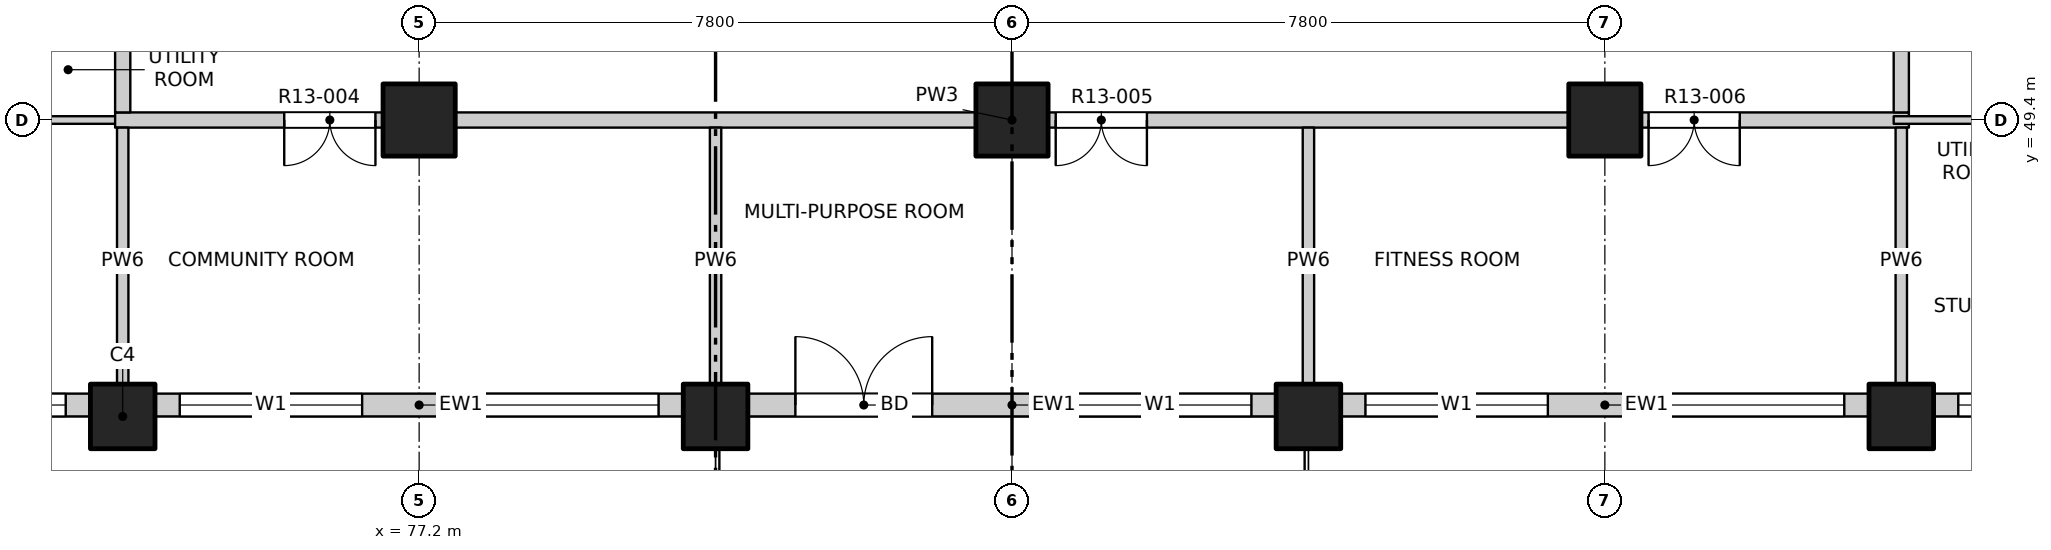
"""IFC4 building model, lengths in metres.
Left out: names, types, materials, properties, quantities, classifications, styles, units other than length and angle.
Written with IfcOpenShell. Run it as: python <this file> out.ifc"""

import sys

from ifc_helpers import new_model, si_unit, direction, frame, frame_2d, origin, origin_2d, place, context, subcontext, project, spatial, rectangle, extrude, element, fill, save


model = new_model("IFC4")
c1 = context("Model", 3, precision=1e-05, world=origin(), true_north=direction((0.0, 1.0)))
c2 = subcontext(c1, "Body", "Model", "MODEL_VIEW")
j1 = project(units=[si_unit("LENGTHUNIT", "METRE"), si_unit("PLANEANGLEUNIT", "RADIAN")], contexts=[c1])
p1 = place(None, origin())
s1 = spatial("IfcSite", under=j1, at=p1, CompositionType="ELEMENT")
p2 = place(p1, origin())
s2 = spatial("IfcBuilding", under=s1, at=p2, CompositionType="ELEMENT")
p3 = place(p2, frame((0.0, 0.0, 140.7)))
s3 = spatial("IfcBuildingStorey", under=s2, at=p3, CompositionType="ELEMENT", Elevation=140.7)
for number, where, z_axis, x_axis in (
    (1, (73.3, 45.5, -0.25), (0.0, 0.0, 1.0), (1.0, 0.0, 0.0)),
    (2, (81.1, 45.5, -0.25), (0.0, 0.0, 1.0), (1.0, 0.0, 0.0)),
    (3, (88.9, 45.5, -0.25), (0.0, 0.0, 1.0), (1.0, 0.0, 0.0)),
    (4, (96.7, 45.5, -0.25), (0.0, 0.0, 1.0), (1.0, 0.0, 0.0)),
):
    element("IfcColumn", number, at=place(p3, frame(where, z_axis=z_axis, x_axis=x_axis)), inside=s3, PredefinedType="COLUMN", context=c2, shape_type="SweptSolid", body=[
        extrude(rectangle(XDim=0.85, YDim=0.85, at=origin_2d()), origin(), (0.0, 0.0, 1.0), 3.35),
    ])
for number, where, z_axis, x_axis in (
    (5, (77.2, 49.4, -0.25), (0.0, 0.0, 1.0), (1.0, 0.0, 0.0)),
    (6, (85.0, 49.4, -0.25), (0.0, 0.0, 1.0), (1.0, 0.0, 0.0)),
    (7, (92.8, 49.4, -0.25), (0.0, 0.0, 1.0), (1.0, 0.0, 0.0)),
):
    element("IfcColumn", number, at=place(p3, frame(where, z_axis=z_axis, x_axis=x_axis)), inside=s3, PredefinedType="COLUMN", context=c2, shape_type="SweptSolid", body=[
        extrude(rectangle(XDim=0.95, YDim=0.95, at=origin_2d()), origin(), (0.0, 0.0, 1.0), 3.35),
    ])
p4 = place(p3, frame((69.4, 45.65, 0.0), z_axis=(0.0, 0.0, 1.0), x_axis=(1.0, 0.0, 0.0)))
e8 = element("IfcWall", 8, at=p4, inside=s3, PredefinedType="SOLIDWALL", context=c2, shape_type="SweptSolid", body=[
    extrude(rectangle(XDim=3.475, YDim=0.3, at=frame_2d((1.738, 0.0))), origin(), (0.0, 0.0, 1.0), 3.1),
])
p5 = place(p4, frame((0.75, 0.0, 0.9)))
e9 = element("IfcOpeningElement", 9, at=p5, cuts=e8, PredefinedType="OPENING", context=c2, shape_type="SweptSolid", body=[
    extrude(rectangle(XDim=2.4, YDim=1.8, at=frame_2d((1.2, 0.9))), frame((0.0, 0.16, 0.0), z_axis=(0.0, -1.0, 0.0), x_axis=(1.0, 0.0, 0.0)), (0.0, 0.0, 1.0), 0.32),
])
p6 = place(p3, frame((73.725, 45.65, 0.0), z_axis=(0.0, 0.0, 1.0), x_axis=(1.0, 0.0, 0.0)))
e10 = element("IfcWall", 10, at=p6, inside=s3, PredefinedType="SOLIDWALL", context=c2, shape_type="SweptSolid", body=[
    extrude(rectangle(XDim=6.95, YDim=0.3, at=frame_2d((3.475, 0.0))), origin(), (0.0, 0.0, 1.0), 3.1),
])
p7 = place(p6, frame((0.325, 0.0, 0.9)))
e11 = element("IfcOpeningElement", 11, at=p7, cuts=e10, PredefinedType="OPENING", context=c2, shape_type="SweptSolid", body=[
    extrude(rectangle(XDim=2.4, YDim=1.8, at=frame_2d((1.2, 0.9))), frame((0.0, 0.16, 0.0), z_axis=(0.0, -1.0, 0.0), x_axis=(1.0, 0.0, 0.0)), (0.0, 0.0, 1.0), 0.32),
])
p8 = place(p6, frame((4.225, 0.0, 0.9)))
e12 = element("IfcOpeningElement", 12, at=p8, cuts=e10, PredefinedType="OPENING", context=c2, shape_type="SweptSolid", body=[
    extrude(rectangle(XDim=2.4, YDim=1.8, at=frame_2d((1.2, 0.9))), frame((0.0, 0.16, 0.0), z_axis=(0.0, -1.0, 0.0), x_axis=(1.0, 0.0, 0.0)), (0.0, 0.0, 1.0), 0.32),
])
p9 = place(p3, frame((81.525, 45.65, 0.0), z_axis=(0.0, 0.0, 1.0), x_axis=(1.0, 0.0, 0.0)))
e13 = element("IfcWall", 13, at=p9, inside=s3, PredefinedType="SOLIDWALL", context=c2, shape_type="SweptSolid", body=[
    extrude(rectangle(XDim=6.95, YDim=0.3, at=frame_2d((3.475, 0.0))), origin(), (0.0, 0.0, 1.0), 3.1),
])
p10 = place(p9, frame((0.625, 0.0, 0.0)))
e14 = element("IfcOpeningElement", 14, at=p10, cuts=e13, PredefinedType="OPENING", context=c2, shape_type="SweptSolid", body=[
    extrude(rectangle(XDim=1.8, YDim=2.4, at=frame_2d((0.9, 1.2))), frame((0.0, 0.16, 0.0), z_axis=(0.0, -1.0, 0.0), x_axis=(1.0, 0.0, 0.0)), (0.0, 0.0, 1.0), 0.32),
])
p11 = place(p9, frame((4.225, 0.0, 0.9)))
e15 = element("IfcOpeningElement", 15, at=p11, cuts=e13, PredefinedType="OPENING", context=c2, shape_type="SweptSolid", body=[
    extrude(rectangle(XDim=2.4, YDim=1.8, at=frame_2d((1.2, 0.9))), frame((0.0, 0.16, 0.0), z_axis=(0.0, -1.0, 0.0), x_axis=(1.0, 0.0, 0.0)), (0.0, 0.0, 1.0), 0.32),
])
p12 = place(p3, frame((89.325, 45.65, 0.0), z_axis=(0.0, 0.0, 1.0), x_axis=(1.0, 0.0, 0.0)))
e16 = element("IfcWall", 16, at=p12, inside=s3, PredefinedType="SOLIDWALL", context=c2, shape_type="SweptSolid", body=[
    extrude(rectangle(XDim=6.95, YDim=0.3, at=frame_2d((3.475, 0.0))), origin(), (0.0, 0.0, 1.0), 3.1),
])
p13 = place(p12, frame((0.325, 0.0, 0.9)))
e17 = element("IfcOpeningElement", 17, at=p13, cuts=e16, PredefinedType="OPENING", context=c2, shape_type="SweptSolid", body=[
    extrude(rectangle(XDim=2.4, YDim=1.8, at=frame_2d((1.2, 0.9))), frame((0.0, 0.16, 0.0), z_axis=(0.0, -1.0, 0.0), x_axis=(1.0, 0.0, 0.0)), (0.0, 0.0, 1.0), 0.32),
])
p14 = place(p12, frame((4.225, 0.0, 0.9)))
e18 = element("IfcOpeningElement", 18, at=p14, cuts=e16, PredefinedType="OPENING", context=c2, shape_type="SweptSolid", body=[
    extrude(rectangle(XDim=2.4, YDim=1.8, at=frame_2d((1.2, 0.9))), frame((0.0, 0.16, 0.0), z_axis=(0.0, -1.0, 0.0), x_axis=(1.0, 0.0, 0.0)), (0.0, 0.0, 1.0), 0.32),
])
p15 = place(p3, frame((97.125, 45.65, 0.0), z_axis=(0.0, 0.0, 1.0), x_axis=(1.0, 0.0, 0.0)))
e19 = element("IfcWall", 19, at=p15, inside=s3, PredefinedType="SOLIDWALL", context=c2, shape_type="SweptSolid", body=[
    extrude(rectangle(XDim=3.475, YDim=0.3, at=frame_2d((1.738, 0.0))), origin(), (0.0, 0.0, 1.0), 3.1),
])
p16 = place(p15, frame((0.325, 0.0, 0.9)))
e20 = element("IfcOpeningElement", 20, at=p16, cuts=e19, PredefinedType="OPENING", context=c2, shape_type="SweptSolid", body=[
    extrude(rectangle(XDim=2.4, YDim=1.8, at=frame_2d((1.2, 0.9))), frame((0.0, 0.16, 0.0), z_axis=(0.0, -1.0, 0.0), x_axis=(1.0, 0.0, 0.0)), (0.0, 0.0, 1.0), 0.32),
])
p17 = place(p3, frame((65.8, 49.4, 0.0), z_axis=(0.0, 0.0, 1.0), x_axis=(1.0, 0.0, 0.0)))
e21 = element("IfcWall", 21, at=p17, inside=s3, PredefinedType="PARTITIONING", context=c2, shape_type="SweptSolid", body=[
    extrude(rectangle(XDim=7.6, YDim=0.1, at=frame_2d((3.8, 0.0))), origin(), (0.0, 0.0, 1.0), 3.1),
])
p18 = place(p17, frame((4.19, 0.0, 0.0)))
e22 = element("IfcOpeningElement", 22, at=p18, cuts=e21, PredefinedType="OPENING", context=c2, shape_type="SweptSolid", body=[
    extrude(rectangle(XDim=0.9, YDim=2.1, at=frame_2d((0.45, 1.05))), frame((0.0, 0.06, 0.0), z_axis=(0.0, -1.0, 0.0), x_axis=(1.0, 0.0, 0.0)), (0.0, 0.0, 1.0), 0.12),
])
p19 = place(p3, frame((73.2, 49.4, 0.0), z_axis=(0.0, 0.0, 1.0), x_axis=(1.0, 0.0, 0.0)))
e23 = element("IfcWall", 23, at=p19, inside=s3, PredefinedType="PARTITIONING", context=c2, shape_type="SweptSolid", body=[
    extrude(rectangle(XDim=23.6, YDim=0.2, at=frame_2d((11.8, 0.0))), origin(), (0.0, 0.0, 1.0), 3.1),
])
p20 = place(p19, frame((2.225, 0.0, 0.0)))
e24 = element("IfcOpeningElement", 24, at=p20, cuts=e23, PredefinedType="OPENING", context=c2, shape_type="SweptSolid", body=[
    extrude(rectangle(XDim=1.2, YDim=2.1, at=frame_2d((0.6, 1.05))), frame((0.0, 0.11, 0.0), z_axis=(0.0, -1.0, 0.0), x_axis=(1.0, 0.0, 0.0)), (0.0, 0.0, 1.0), 0.22),
])
p21 = place(p19, frame((12.375, 0.0, 0.0)))
e25 = element("IfcOpeningElement", 25, at=p21, cuts=e23, PredefinedType="OPENING", context=c2, shape_type="SweptSolid", body=[
    extrude(rectangle(XDim=1.2, YDim=2.1, at=frame_2d((0.6, 1.05))), frame((0.0, 0.11, 0.0), z_axis=(0.0, -1.0, 0.0), x_axis=(1.0, 0.0, 0.0)), (0.0, 0.0, 1.0), 0.22),
])
p22 = place(p19, frame((20.175, 0.0, 0.0)))
e26 = element("IfcOpeningElement", 26, at=p22, cuts=e23, PredefinedType="OPENING", context=c2, shape_type="SweptSolid", body=[
    extrude(rectangle(XDim=1.2, YDim=2.1, at=frame_2d((0.6, 1.05))), frame((0.0, 0.11, 0.0), z_axis=(0.0, -1.0, 0.0), x_axis=(1.0, 0.0, 0.0)), (0.0, 0.0, 1.0), 0.22),
])
p23 = place(p3, frame((96.6, 49.4, 0.0), z_axis=(0.0, 0.0, 1.0), x_axis=(1.0, 0.0, 0.0)))
e27 = element("IfcWall", 27, at=p23, inside=s3, PredefinedType="PARTITIONING", context=c2, shape_type="SweptSolid", body=[
    extrude(rectangle(XDim=7.6, YDim=0.1, at=frame_2d((3.8, 0.0))), origin(), (0.0, 0.0, 1.0), 3.1),
])
p24 = place(p23, frame((2.51, 0.0, 0.0)))
e28 = element("IfcOpeningElement", 28, at=p24, cuts=e27, PredefinedType="OPENING", context=c2, shape_type="SweptSolid", body=[
    extrude(rectangle(XDim=0.9, YDim=2.1, at=frame_2d((0.45, 1.05))), frame((0.0, 0.06, 0.0), z_axis=(0.0, -1.0, 0.0), x_axis=(1.0, 0.0, 0.0)), (0.0, 0.0, 1.0), 0.12),
])
p25 = place(p3, frame((73.3, 45.8, 0.0), z_axis=(0.0, 0.0, 1.0), x_axis=(0.0, 1.0, 0.0)))
e29 = element("IfcWall", 29, at=p25, inside=s3, PredefinedType="PARTITIONING", context=c2, shape_type="SweptSolid", body=[
    extrude(rectangle(XDim=3.5, YDim=0.15, at=frame_2d((1.75, 0.0))), origin(), (0.0, 0.0, 1.0), 3.1),
])
p26 = place(p3, frame((73.3, 49.5, 0.0), z_axis=(0.0, 0.0, 1.0), x_axis=(0.0, 1.0, 0.0)))
e30 = element("IfcWall", 30, at=p26, inside=s3, PredefinedType="PARTITIONING", context=c2, shape_type="SweptSolid", body=[
    extrude(rectangle(XDim=34.7, YDim=0.2, at=frame_2d((17.35, 0.0))), origin(), (0.0, 0.0, 1.0), 3.1),
])
p27 = place(p26, frame((3.575, 0.0, 0.0)))
e31 = element("IfcOpeningElement", 31, at=p27, cuts=e30, PredefinedType="OPENING", context=c2, shape_type="SweptSolid", body=[
    extrude(rectangle(XDim=1.0, YDim=2.1, at=frame_2d((0.5, 1.05))), frame((0.0, 0.11, 0.0), z_axis=(0.0, -1.0, 0.0), x_axis=(1.0, 0.0, 0.0)), (0.0, 0.0, 1.0), 0.22),
])
p28 = place(p26, frame((21.975, 0.0, 0.0)))
e32 = element("IfcOpeningElement", 32, at=p28, cuts=e30, PredefinedType="OPENING", context=c2, shape_type="SweptSolid", body=[
    extrude(rectangle(XDim=1.0, YDim=2.1, at=frame_2d((0.5, 1.05))), frame((0.0, 0.11, 0.0), z_axis=(0.0, -1.0, 0.0), x_axis=(1.0, 0.0, 0.0)), (0.0, 0.0, 1.0), 0.22),
])
p29 = place(p26, frame((29.125, 0.0, 0.0)))
e33 = element("IfcOpeningElement", 33, at=p29, cuts=e30, PredefinedType="OPENING", context=c2, shape_type="SweptSolid", body=[
    extrude(rectangle(XDim=1.0, YDim=2.1, at=frame_2d((0.5, 1.05))), frame((0.0, 0.11, 0.0), z_axis=(0.0, -1.0, 0.0), x_axis=(1.0, 0.0, 0.0)), (0.0, 0.0, 1.0), 0.22),
])
for number, where, z_axis, x_axis in (
    (34, (81.1, 45.8, 0.0), (0.0, 0.0, 1.0), (0.0, 1.0, 0.0)),
    (35, (88.9, 45.8, 0.0), (0.0, 0.0, 1.0), (0.0, 1.0, 0.0)),
    (36, (96.7, 45.8, 0.0), (0.0, 0.0, 1.0), (0.0, 1.0, 0.0)),
):
    element("IfcWall", number, at=place(p3, frame(where, z_axis=z_axis, x_axis=x_axis)), inside=s3, PredefinedType="PARTITIONING", context=c2, shape_type="SweptSolid", body=[
        extrude(rectangle(XDim=3.5, YDim=0.15, at=frame_2d((1.75, 0.0))), origin(), (0.0, 0.0, 1.0), 3.1),
    ])
p30 = place(p3, frame((96.7, 49.5, 0.0), z_axis=(0.0, 0.0, 1.0), x_axis=(0.0, 1.0, 0.0)))
e37 = element("IfcWall", 37, at=p30, inside=s3, PredefinedType="PARTITIONING", context=c2, shape_type="SweptSolid", body=[
    extrude(rectangle(XDim=34.7, YDim=0.2, at=frame_2d((17.35, 0.0))), origin(), (0.0, 0.0, 1.0), 3.1),
])
p31 = place(p30, frame((3.675, 0.0, 0.0)))
e38 = element("IfcOpeningElement", 38, at=p31, cuts=e37, PredefinedType="OPENING", context=c2, shape_type="SweptSolid", body=[
    extrude(rectangle(XDim=1.0, YDim=2.1, at=frame_2d((0.5, 1.05))), frame((0.0, 0.11, 0.0), z_axis=(0.0, -1.0, 0.0), x_axis=(1.0, 0.0, 0.0)), (0.0, 0.0, 1.0), 0.22),
])
p32 = place(p30, frame((21.725, 0.0, 0.0)))
e39 = element("IfcOpeningElement", 39, at=p32, cuts=e37, PredefinedType="OPENING", context=c2, shape_type="SweptSolid", body=[
    extrude(rectangle(XDim=1.0, YDim=2.1, at=frame_2d((0.5, 1.05))), frame((0.0, 0.11, 0.0), z_axis=(0.0, -1.0, 0.0), x_axis=(1.0, 0.0, 0.0)), (0.0, 0.0, 1.0), 0.22),
])
p33 = place(p30, frame((29.125, 0.0, 0.0)))
e40 = element("IfcOpeningElement", 40, at=p33, cuts=e37, PredefinedType="OPENING", context=c2, shape_type="SweptSolid", body=[
    extrude(rectangle(XDim=1.0, YDim=2.1, at=frame_2d((0.5, 1.05))), frame((0.0, 0.11, 0.0), z_axis=(0.0, -1.0, 0.0), x_axis=(1.0, 0.0, 0.0)), (0.0, 0.0, 1.0), 0.22),
])
p34 = place(p5, origin())
e41 = element("IfcWindow", 41, at=p34, inside=s3, PartitioningType="DOUBLE_PANEL_VERTICAL", PredefinedType="WINDOW", context=c2, shape_type="SweptSolid", body=[
    extrude(rectangle(XDim=2.4, YDim=1.8, at=frame_2d((1.2, 0.9))), frame((0.0, 0.03, 0.0), z_axis=(0.0, -1.0, 0.0), x_axis=(1.0, 0.0, 0.0)), (0.0, 0.0, 1.0), 0.06),
])
fill(e9, e41)
p35 = place(p7, origin())
e42 = element("IfcWindow", 42, at=p35, inside=s3, PartitioningType="DOUBLE_PANEL_VERTICAL", PredefinedType="WINDOW", context=c2, shape_type="SweptSolid", body=[
    extrude(rectangle(XDim=2.4, YDim=1.8, at=frame_2d((1.2, 0.9))), frame((0.0, 0.03, 0.0), z_axis=(0.0, -1.0, 0.0), x_axis=(1.0, 0.0, 0.0)), (0.0, 0.0, 1.0), 0.06),
])
fill(e11, e42)
p36 = place(p8, origin())
e43 = element("IfcWindow", 43, at=p36, inside=s3, PartitioningType="DOUBLE_PANEL_VERTICAL", PredefinedType="WINDOW", context=c2, shape_type="SweptSolid", body=[
    extrude(rectangle(XDim=2.4, YDim=1.8, at=frame_2d((1.2, 0.9))), frame((0.0, 0.03, 0.0), z_axis=(0.0, -1.0, 0.0), x_axis=(1.0, 0.0, 0.0)), (0.0, 0.0, 1.0), 0.06),
])
fill(e12, e43)
p37 = place(p10, origin())
e44 = element("IfcDoor", 44, at=p37, inside=s3, OperationType="DOUBLE_DOOR_SINGLE_SWING", PredefinedType="DOOR", context=c2, shape_type="SweptSolid", body=[
    extrude(rectangle(XDim=1.8, YDim=2.4, at=frame_2d((0.9, 1.2))), frame((0.0, 0.025, 0.0), z_axis=(0.0, -1.0, 0.0), x_axis=(1.0, 0.0, 0.0)), (0.0, 0.0, 1.0), 0.05),
])
fill(e14, e44)
p38 = place(p11, origin())
e45 = element("IfcWindow", 45, at=p38, inside=s3, PartitioningType="DOUBLE_PANEL_VERTICAL", PredefinedType="WINDOW", context=c2, shape_type="SweptSolid", body=[
    extrude(rectangle(XDim=2.4, YDim=1.8, at=frame_2d((1.2, 0.9))), frame((0.0, 0.03, 0.0), z_axis=(0.0, -1.0, 0.0), x_axis=(1.0, 0.0, 0.0)), (0.0, 0.0, 1.0), 0.06),
])
fill(e15, e45)
p39 = place(p13, origin())
e46 = element("IfcWindow", 46, at=p39, inside=s3, PartitioningType="DOUBLE_PANEL_VERTICAL", PredefinedType="WINDOW", context=c2, shape_type="SweptSolid", body=[
    extrude(rectangle(XDim=2.4, YDim=1.8, at=frame_2d((1.2, 0.9))), frame((0.0, 0.03, 0.0), z_axis=(0.0, -1.0, 0.0), x_axis=(1.0, 0.0, 0.0)), (0.0, 0.0, 1.0), 0.06),
])
fill(e17, e46)
p40 = place(p14, origin())
e47 = element("IfcWindow", 47, at=p40, inside=s3, PartitioningType="DOUBLE_PANEL_VERTICAL", PredefinedType="WINDOW", context=c2, shape_type="SweptSolid", body=[
    extrude(rectangle(XDim=2.4, YDim=1.8, at=frame_2d((1.2, 0.9))), frame((0.0, 0.03, 0.0), z_axis=(0.0, -1.0, 0.0), x_axis=(1.0, 0.0, 0.0)), (0.0, 0.0, 1.0), 0.06),
])
fill(e18, e47)
p41 = place(p16, origin())
e48 = element("IfcWindow", 48, at=p41, inside=s3, PartitioningType="DOUBLE_PANEL_VERTICAL", PredefinedType="WINDOW", context=c2, shape_type="SweptSolid", body=[
    extrude(rectangle(XDim=2.4, YDim=1.8, at=frame_2d((1.2, 0.9))), frame((0.0, 0.03, 0.0), z_axis=(0.0, -1.0, 0.0), x_axis=(1.0, 0.0, 0.0)), (0.0, 0.0, 1.0), 0.06),
])
fill(e20, e48)
p42 = place(p20, origin())
e49 = element("IfcDoor", 49, at=p42, inside=s3, OperationType="DOUBLE_DOOR_SINGLE_SWING", PredefinedType="DOOR", context=c2, shape_type="SweptSolid", body=[
    extrude(rectangle(XDim=1.2, YDim=2.1, at=frame_2d((0.6, 1.05))), frame((0.0, 0.025, 0.0), z_axis=(0.0, -1.0, 0.0), x_axis=(1.0, 0.0, 0.0)), (0.0, 0.0, 1.0), 0.05),
])
fill(e24, e49)
p43 = place(p21, origin())
e50 = element("IfcDoor", 50, at=p43, inside=s3, OperationType="DOUBLE_DOOR_SINGLE_SWING", PredefinedType="DOOR", context=c2, shape_type="SweptSolid", body=[
    extrude(rectangle(XDim=1.2, YDim=2.1, at=frame_2d((0.6, 1.05))), frame((0.0, 0.025, 0.0), z_axis=(0.0, -1.0, 0.0), x_axis=(1.0, 0.0, 0.0)), (0.0, 0.0, 1.0), 0.05),
])
fill(e25, e50)
p44 = place(p22, origin())
e51 = element("IfcDoor", 51, at=p44, inside=s3, OperationType="DOUBLE_DOOR_SINGLE_SWING", PredefinedType="DOOR", context=c2, shape_type="SweptSolid", body=[
    extrude(rectangle(XDim=1.2, YDim=2.1, at=frame_2d((0.6, 1.05))), frame((0.0, 0.025, 0.0), z_axis=(0.0, -1.0, 0.0), x_axis=(1.0, 0.0, 0.0)), (0.0, 0.0, 1.0), 0.05),
])
fill(e26, e51)
save(model, sys.argv[1])
